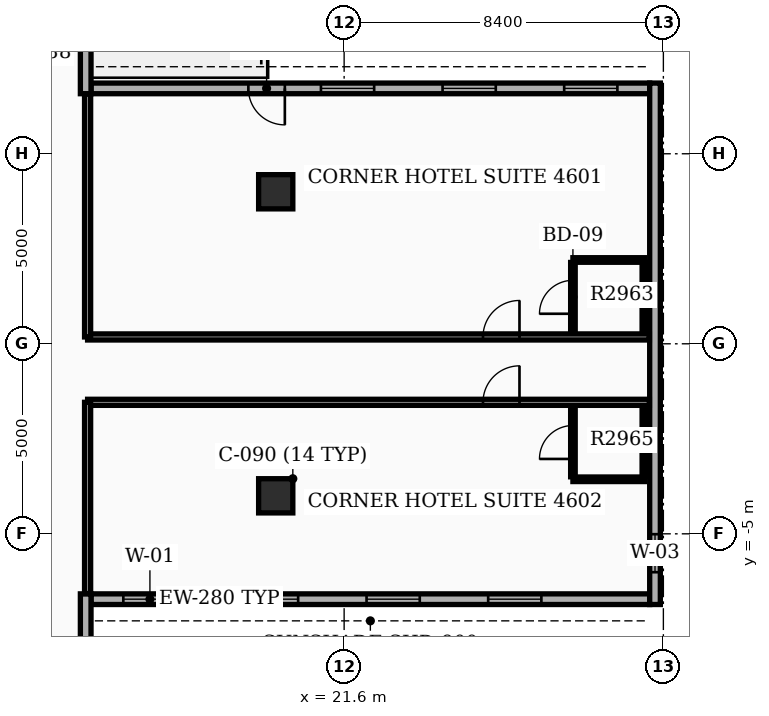
"""IFC4 building model, lengths in metres.
Left out: names, types, materials, properties, quantities, classifications, styles, units other than length and angle.
Written with IfcOpenShell. Run it as: python <this file> out.ifc"""

import sys

from ifc_helpers import new_model, si_unit, direction, frame, frame_2d, origin, origin_2d, place, context, subcontext, project, spatial, rectangle, extrude, element, fill, save


model = new_model("IFC4")
c1 = context("Model", 3, precision=1e-05, world=origin(), true_north=direction((0.0, 1.0)))
c2 = subcontext(c1, "Body", "Model", "MODEL_VIEW")
j1 = project(units=[si_unit("LENGTHUNIT", "METRE"), si_unit("PLANEANGLEUNIT", "RADIAN")], contexts=[c1])
p1 = place(None, origin())
s1 = spatial("IfcSite", under=j1, at=p1, CompositionType="ELEMENT")
p2 = place(p1, origin())
s2 = spatial("IfcBuilding", under=s1, at=p2, CompositionType="ELEMENT")
p3 = place(p2, frame((0.0, 0.0, 183.9)))
s3 = spatial("IfcBuildingStorey", under=s2, at=p3, CompositionType="ELEMENT", Elevation=183.9)
for number, where, z_axis, x_axis in (
    (1, (19.8, -4.0, 0.0), (0.0, 0.0, 1.0), (1.0, 0.0, 0.0)),
    (2, (19.8, 4.0, 0.0), (0.0, 0.0, 1.0), (1.0, 0.0, 0.0)),
):
    element("IfcColumn", number, at=place(p3, frame(where, z_axis=z_axis, x_axis=x_axis)), inside=s3, PredefinedType="COLUMN", context=c2, shape_type="SweptSolid", body=[
        extrude(rectangle(XDim=0.9, YDim=0.9, at=origin_2d()), origin(), (0.0, 0.0, 1.0), 3.9),
    ])
p4 = place(p3, frame((14.94, -6.72, 0.0), z_axis=(0.0, 0.0, 1.0), x_axis=(1.0, 0.0, 0.0)))
e3 = element("IfcWall", 3, at=p4, inside=s3, PredefinedType="STANDARD", context=c2, shape_type="SweptSolid", body=[
    extrude(rectangle(XDim=14.7, YDim=0.28, at=frame_2d((7.35, 0.0))), origin(), (0.0, 0.0, 1.0), 2.97),
])
p5 = place(p4, frame((0.85, 0.0, 0.8)))
e4 = element("IfcOpeningElement", 4, at=p5, cuts=e3, PredefinedType="OPENING", context=c2, shape_type="SweptSolid", body=[
    extrude(rectangle(XDim=1.4, YDim=1.6, at=frame_2d((0.7, 0.8))), frame((0.0, 0.15, 0.0), z_axis=(0.0, -1.0, 0.0), x_axis=(1.0, 0.0, 0.0)), (0.0, 0.0, 1.0), 0.3),
])
p6 = place(p4, frame((4.05, 0.0, 0.8)))
e5 = element("IfcOpeningElement", 5, at=p6, cuts=e3, PredefinedType="OPENING", context=c2, shape_type="SweptSolid", body=[
    extrude(rectangle(XDim=1.4, YDim=1.6, at=frame_2d((0.7, 0.8))), frame((0.0, 0.15, 0.0), z_axis=(0.0, -1.0, 0.0), x_axis=(1.0, 0.0, 0.0)), (0.0, 0.0, 1.0), 0.3),
])
p7 = place(p4, frame((7.25, 0.0, 0.8)))
e6 = element("IfcOpeningElement", 6, at=p7, cuts=e3, PredefinedType="OPENING", context=c2, shape_type="SweptSolid", body=[
    extrude(rectangle(XDim=1.4, YDim=1.6, at=frame_2d((0.7, 0.8))), frame((0.0, 0.15, 0.0), z_axis=(0.0, -1.0, 0.0), x_axis=(1.0, 0.0, 0.0)), (0.0, 0.0, 1.0), 0.3),
])
p8 = place(p4, frame((10.45, 0.0, 0.8)))
e7 = element("IfcOpeningElement", 7, at=p8, cuts=e3, PredefinedType="OPENING", context=c2, shape_type="SweptSolid", body=[
    extrude(rectangle(XDim=1.4, YDim=1.6, at=frame_2d((0.7, 0.8))), frame((0.0, 0.15, 0.0), z_axis=(0.0, -1.0, 0.0), x_axis=(1.0, 0.0, 0.0)), (0.0, 0.0, 1.0), 0.3),
])
p9 = place(p3, frame((29.64, 6.72, 0.0), z_axis=(0.0, 0.0, 1.0), x_axis=(-1.0, 0.0, 0.0)))
e8 = element("IfcWall", 8, at=p9, inside=s3, PredefinedType="STANDARD", context=c2, shape_type="SweptSolid", body=[
    extrude(rectangle(XDim=14.7, YDim=0.28, at=frame_2d((7.35, 0.0))), origin(), (0.0, 0.0, 1.0), 2.97),
])
p10 = place(p9, frame((0.85, 0.0, 0.8)))
e9 = element("IfcOpeningElement", 9, at=p10, cuts=e8, PredefinedType="OPENING", context=c2, shape_type="SweptSolid", body=[
    extrude(rectangle(XDim=1.4, YDim=1.6, at=frame_2d((0.7, 0.8))), frame((0.0, 0.15, 0.0), z_axis=(0.0, -1.0, 0.0), x_axis=(1.0, 0.0, 0.0)), (0.0, 0.0, 1.0), 0.3),
])
p11 = place(p9, frame((4.05, 0.0, 0.8)))
e10 = element("IfcOpeningElement", 10, at=p11, cuts=e8, PredefinedType="OPENING", context=c2, shape_type="SweptSolid", body=[
    extrude(rectangle(XDim=1.4, YDim=1.6, at=frame_2d((0.7, 0.8))), frame((0.0, 0.15, 0.0), z_axis=(0.0, -1.0, 0.0), x_axis=(1.0, 0.0, 0.0)), (0.0, 0.0, 1.0), 0.3),
])
p12 = place(p9, frame((7.25, 0.0, 0.8)))
e11 = element("IfcOpeningElement", 11, at=p12, cuts=e8, PredefinedType="OPENING", context=c2, shape_type="SweptSolid", body=[
    extrude(rectangle(XDim=1.4, YDim=1.6, at=frame_2d((0.7, 0.8))), frame((0.0, 0.15, 0.0), z_axis=(0.0, -1.0, 0.0), x_axis=(1.0, 0.0, 0.0)), (0.0, 0.0, 1.0), 0.3),
])
p13 = place(p9, frame((9.6, 0.0, 0.0)))
e12 = element("IfcOpeningElement", 12, at=p13, cuts=e8, PredefinedType="OPENING", context=c2, shape_type="SweptSolid", body=[
    extrude(rectangle(XDim=0.96, YDim=2.1, at=frame_2d((0.48, 1.05))), frame((0.0, 0.15, 0.0), z_axis=(0.0, -1.0, 0.0), x_axis=(1.0, 0.0, 0.0)), (0.0, 0.0, 1.0), 0.3),
])
p14 = place(p3, frame((29.78, -6.86, 0.0), z_axis=(0.0, 0.0, 1.0), x_axis=(0.0, 1.0, 0.0)))
e13 = element("IfcWall", 13, at=p14, inside=s3, PredefinedType="STANDARD", context=c2, shape_type="SweptSolid", body=[
    extrude(rectangle(XDim=13.72, YDim=0.28, at=frame_2d((6.86, 0.0))), origin(), (0.0, 0.0, 1.0), 2.97),
])
p15 = place(p14, frame((0.85, 0.0, 0.85)))
e14 = element("IfcOpeningElement", 14, at=p15, cuts=e13, PredefinedType="OPENING", context=c2, shape_type="SweptSolid", body=[
    extrude(rectangle(XDim=1.0, YDim=1.5, at=frame_2d((0.5, 0.75))), frame((0.0, 0.15, 0.0), z_axis=(0.0, -1.0, 0.0), x_axis=(1.0, 0.0, 0.0)), (0.0, 0.0, 1.0), 0.3),
])
for number, where, z_axis, x_axis in (
    (15, (14.8, 6.58, 0.0), (0.0, 0.0, 1.0), (0.0, 1.0, 0.0)),
    (16, (14.8, -6.58, 0.0), (0.0, 0.0, 1.0), (0.0, -1.0, 0.0)),
):
    element("IfcWall", number, at=place(p3, frame(where, z_axis=z_axis, x_axis=x_axis)), inside=s3, PredefinedType="STANDARD", context=c2, shape_type="SweptSolid", body=[
        extrude(rectangle(XDim=6.86, YDim=0.28, at=frame_2d((3.43, 0.0))), origin(), (0.0, 0.0, 1.0), 2.97),
    ])
p16 = place(p3, frame((14.85, 0.18, 0.0), z_axis=(0.0, 0.0, 1.0), x_axis=(1.0, 0.0, 0.0)))
e17 = element("IfcWall", 17, at=p16, inside=s3, PredefinedType="PARTITIONING", context=c2, shape_type="SweptSolid", body=[
    extrude(rectangle(XDim=14.782, YDim=0.16, at=frame_2d((7.391, 0.0))), origin(), (0.0, 0.0, 1.0), 2.96),
])
p17 = place(p16, frame((10.404, 0.0, 0.0)))
e18 = element("IfcOpeningElement", 18, at=p17, cuts=e17, PredefinedType="OPENING", context=c2, shape_type="SweptSolid", body=[
    extrude(rectangle(XDim=0.96, YDim=2.15, at=frame_2d((0.48, 1.075))), frame((0.0, 0.09, 0.0), z_axis=(0.0, -1.0, 0.0), x_axis=(1.0, 0.0, 0.0)), (0.0, 0.0, 1.0), 0.18),
])
p18 = place(p3, frame((14.85, 0.18, 0.0), z_axis=(0.0, 0.0, 1.0), x_axis=(0.0, 1.0, 0.0)))
e19 = element("IfcWall", 19, at=p18, inside=s3, PredefinedType="PARTITIONING", context=c2, shape_type="SweptSolid", body=[
    extrude(rectangle(XDim=6.392, YDim=0.16, at=frame_2d((3.196, 0.0))), origin(), (0.0, 0.0, 1.0), 2.96),
])
p19 = place(p3, frame((27.62, 0.32, 0.0), z_axis=(0.0, 0.0, 1.0), x_axis=(0.0, 1.0, 0.0)))
e20 = element("IfcWall", 20, at=p19, inside=s3, PredefinedType="PARTITIONING", context=c2, shape_type="SweptSolid", body=[
    extrude(rectangle(XDim=1.82, YDim=0.12, at=frame_2d((0.91, 0.0))), origin(), (0.0, 0.0, 1.0), 2.96),
])
p20 = place(p19, frame((0.47, 0.0, 0.0)))
e21 = element("IfcOpeningElement", 21, at=p20, cuts=e20, PredefinedType="OPENING", context=c2, shape_type="SweptSolid", body=[
    extrude(rectangle(XDim=0.88, YDim=2.1, at=frame_2d((0.44, 1.05))), frame((0.0, 0.07, 0.0), z_axis=(0.0, -1.0, 0.0), x_axis=(1.0, 0.0, 0.0)), (0.0, 0.0, 1.0), 0.14),
])
p21 = place(p3, frame((29.5, 0.32, 0.0), z_axis=(0.0, 0.0, 1.0), x_axis=(0.0, 1.0, 0.0)))
e22 = element("IfcWall", 22, at=p21, inside=s3, PredefinedType="PARTITIONING", context=c2, shape_type="SweptSolid", body=[
    extrude(rectangle(XDim=1.82, YDim=0.12, at=frame_2d((0.91, 0.0))), origin(), (0.0, 0.0, 1.0), 2.96),
])
p22 = place(p3, frame((27.62, 2.205, 0.0), z_axis=(0.0, 0.0, 1.0), x_axis=(1.0, 0.0, 0.0)))
e23 = element("IfcWall", 23, at=p22, inside=s3, PredefinedType="PARTITIONING", context=c2, shape_type="SweptSolid", body=[
    extrude(rectangle(XDim=1.88, YDim=0.12, at=frame_2d((0.94, 0.0))), origin(), (0.0, 0.0, 1.0), 2.96),
])
p23 = place(p3, frame((14.85, -1.54, 0.0), z_axis=(0.0, 0.0, 1.0), x_axis=(1.0, 0.0, 0.0)))
e24 = element("IfcWall", 24, at=p23, inside=s3, PredefinedType="PARTITIONING", context=c2, shape_type="SweptSolid", body=[
    extrude(rectangle(XDim=14.782, YDim=0.16, at=frame_2d((7.391, 0.0))), origin(), (0.0, 0.0, 1.0), 2.96),
])
p24 = place(p23, frame((10.404, 0.0, 0.0)))
e25 = element("IfcOpeningElement", 25, at=p24, cuts=e24, PredefinedType="OPENING", context=c2, shape_type="SweptSolid", body=[
    extrude(rectangle(XDim=0.96, YDim=2.15, at=frame_2d((0.48, 1.075))), frame((0.0, 0.09, 0.0), z_axis=(0.0, -1.0, 0.0), x_axis=(1.0, 0.0, 0.0)), (0.0, 0.0, 1.0), 0.18),
])
p25 = place(p3, frame((14.85, -1.54, 0.0), z_axis=(0.0, 0.0, 1.0), x_axis=(0.0, -1.0, 0.0)))
e26 = element("IfcWall", 26, at=p25, inside=s3, PredefinedType="PARTITIONING", context=c2, shape_type="SweptSolid", body=[
    extrude(rectangle(XDim=5.032, YDim=0.16, at=frame_2d((2.516, 0.0))), origin(), (0.0, 0.0, 1.0), 2.96),
])
p26 = place(p3, frame((27.62, -3.5, 0.0), z_axis=(0.0, 0.0, 1.0), x_axis=(0.0, 1.0, 0.0)))
e27 = element("IfcWall", 27, at=p26, inside=s3, PredefinedType="PARTITIONING", context=c2, shape_type="SweptSolid", body=[
    extrude(rectangle(XDim=1.82, YDim=0.12, at=frame_2d((0.91, 0.0))), origin(), (0.0, 0.0, 1.0), 2.96),
])
p27 = place(p26, frame((0.47, 0.0, 0.0)))
e28 = element("IfcOpeningElement", 28, at=p27, cuts=e27, PredefinedType="OPENING", context=c2, shape_type="SweptSolid", body=[
    extrude(rectangle(XDim=0.88, YDim=2.1, at=frame_2d((0.44, 1.05))), frame((0.0, 0.07, 0.0), z_axis=(0.0, -1.0, 0.0), x_axis=(1.0, 0.0, 0.0)), (0.0, 0.0, 1.0), 0.14),
])
p28 = place(p3, frame((29.5, -3.5, 0.0), z_axis=(0.0, 0.0, 1.0), x_axis=(0.0, 1.0, 0.0)))
e29 = element("IfcWall", 29, at=p28, inside=s3, PredefinedType="PARTITIONING", context=c2, shape_type="SweptSolid", body=[
    extrude(rectangle(XDim=1.82, YDim=0.12, at=frame_2d((0.91, 0.0))), origin(), (0.0, 0.0, 1.0), 2.96),
])
p29 = place(p3, frame((27.62, -3.565, 0.0), z_axis=(0.0, 0.0, 1.0), x_axis=(1.0, 0.0, 0.0)))
e30 = element("IfcWall", 30, at=p29, inside=s3, PredefinedType="PARTITIONING", context=c2, shape_type="SweptSolid", body=[
    extrude(rectangle(XDim=1.88, YDim=0.12, at=frame_2d((0.94, 0.0))), origin(), (0.0, 0.0, 1.0), 2.96),
])
p30 = place(p5, origin())
e31 = element("IfcWindow", 31, at=p30, inside=s3, PartitioningType="SINGLE_PANEL", PredefinedType="WINDOW", context=c2, shape_type="SweptSolid", body=[
    extrude(rectangle(XDim=1.4, YDim=1.6, at=frame_2d((0.7, 0.8))), frame((0.0, 0.03, 0.0), z_axis=(0.0, -1.0, 0.0), x_axis=(1.0, 0.0, 0.0)), (0.0, 0.0, 1.0), 0.06),
])
fill(e4, e31)
p31 = place(p6, origin())
e32 = element("IfcWindow", 32, at=p31, inside=s3, PartitioningType="SINGLE_PANEL", PredefinedType="WINDOW", context=c2, shape_type="SweptSolid", body=[
    extrude(rectangle(XDim=1.4, YDim=1.6, at=frame_2d((0.7, 0.8))), frame((0.0, 0.03, 0.0), z_axis=(0.0, -1.0, 0.0), x_axis=(1.0, 0.0, 0.0)), (0.0, 0.0, 1.0), 0.06),
])
fill(e5, e32)
p32 = place(p7, origin())
e33 = element("IfcWindow", 33, at=p32, inside=s3, PartitioningType="SINGLE_PANEL", PredefinedType="WINDOW", context=c2, shape_type="SweptSolid", body=[
    extrude(rectangle(XDim=1.4, YDim=1.6, at=frame_2d((0.7, 0.8))), frame((0.0, 0.03, 0.0), z_axis=(0.0, -1.0, 0.0), x_axis=(1.0, 0.0, 0.0)), (0.0, 0.0, 1.0), 0.06),
])
fill(e6, e33)
p33 = place(p8, origin())
e34 = element("IfcWindow", 34, at=p33, inside=s3, PartitioningType="SINGLE_PANEL", PredefinedType="WINDOW", context=c2, shape_type="SweptSolid", body=[
    extrude(rectangle(XDim=1.4, YDim=1.6, at=frame_2d((0.7, 0.8))), frame((0.0, 0.03, 0.0), z_axis=(0.0, -1.0, 0.0), x_axis=(1.0, 0.0, 0.0)), (0.0, 0.0, 1.0), 0.06),
])
fill(e7, e34)
p34 = place(p10, origin())
e35 = element("IfcWindow", 35, at=p34, inside=s3, PartitioningType="SINGLE_PANEL", PredefinedType="WINDOW", context=c2, shape_type="SweptSolid", body=[
    extrude(rectangle(XDim=1.4, YDim=1.6, at=frame_2d((0.7, 0.8))), frame((0.0, 0.03, 0.0), z_axis=(0.0, -1.0, 0.0), x_axis=(1.0, 0.0, 0.0)), (0.0, 0.0, 1.0), 0.06),
])
fill(e9, e35)
p35 = place(p11, origin())
e36 = element("IfcWindow", 36, at=p35, inside=s3, PartitioningType="SINGLE_PANEL", PredefinedType="WINDOW", context=c2, shape_type="SweptSolid", body=[
    extrude(rectangle(XDim=1.4, YDim=1.6, at=frame_2d((0.7, 0.8))), frame((0.0, 0.03, 0.0), z_axis=(0.0, -1.0, 0.0), x_axis=(1.0, 0.0, 0.0)), (0.0, 0.0, 1.0), 0.06),
])
fill(e10, e36)
p36 = place(p12, origin())
e37 = element("IfcWindow", 37, at=p36, inside=s3, PartitioningType="SINGLE_PANEL", PredefinedType="WINDOW", context=c2, shape_type="SweptSolid", body=[
    extrude(rectangle(XDim=1.4, YDim=1.6, at=frame_2d((0.7, 0.8))), frame((0.0, 0.03, 0.0), z_axis=(0.0, -1.0, 0.0), x_axis=(1.0, 0.0, 0.0)), (0.0, 0.0, 1.0), 0.06),
])
fill(e11, e37)
p37 = place(p15, origin())
e38 = element("IfcWindow", 38, at=p37, inside=s3, PartitioningType="SINGLE_PANEL", PredefinedType="WINDOW", context=c2, shape_type="SweptSolid", body=[
    extrude(rectangle(XDim=1.0, YDim=1.5, at=frame_2d((0.5, 0.75))), frame((0.0, 0.03, 0.0), z_axis=(0.0, -1.0, 0.0), x_axis=(1.0, 0.0, 0.0)), (0.0, 0.0, 1.0), 0.06),
])
fill(e14, e38)
p38 = place(p13, origin())
e39 = element("IfcDoor", 39, at=p38, inside=s3, OperationType="SINGLE_SWING_LEFT", PredefinedType="DOOR", context=c2, shape_type="SweptSolid", body=[
    extrude(rectangle(XDim=0.96, YDim=2.1, at=frame_2d((0.48, 1.05))), frame((0.0, 0.025, 0.0), z_axis=(0.0, -1.0, 0.0), x_axis=(1.0, 0.0, 0.0)), (0.0, 0.0, 1.0), 0.05),
])
fill(e12, e39)
p39 = place(p17, origin())
e40 = element("IfcDoor", 40, at=p39, inside=s3, OperationType="SINGLE_SWING_RIGHT", PredefinedType="DOOR", context=c2, shape_type="SweptSolid", body=[
    extrude(rectangle(XDim=0.96, YDim=2.15, at=frame_2d((0.48, 1.075))), frame((0.0, 0.025, 0.0), z_axis=(0.0, -1.0, 0.0), x_axis=(1.0, 0.0, 0.0)), (0.0, 0.0, 1.0), 0.05),
])
fill(e18, e40)
p40 = place(p20, origin())
e41 = element("IfcDoor", 41, at=p40, inside=s3, OperationType="SINGLE_SWING_LEFT", PredefinedType="DOOR", context=c2, shape_type="SweptSolid", body=[
    extrude(rectangle(XDim=0.88, YDim=2.1, at=frame_2d((0.44, 1.05))), frame((0.0, 0.025, 0.0), z_axis=(0.0, -1.0, 0.0), x_axis=(1.0, 0.0, 0.0)), (0.0, 0.0, 1.0), 0.05),
])
fill(e21, e41)
p41 = place(p24, origin())
e42 = element("IfcDoor", 42, at=p41, inside=s3, OperationType="SINGLE_SWING_RIGHT", PredefinedType="DOOR", context=c2, shape_type="SweptSolid", body=[
    extrude(rectangle(XDim=0.96, YDim=2.15, at=frame_2d((0.48, 1.075))), frame((0.0, 0.025, 0.0), z_axis=(0.0, -1.0, 0.0), x_axis=(1.0, 0.0, 0.0)), (0.0, 0.0, 1.0), 0.05),
])
fill(e25, e42)
p42 = place(p27, origin())
e43 = element("IfcDoor", 43, at=p42, inside=s3, OperationType="SINGLE_SWING_LEFT", PredefinedType="DOOR", context=c2, shape_type="SweptSolid", body=[
    extrude(rectangle(XDim=0.88, YDim=2.1, at=frame_2d((0.44, 1.05))), frame((0.0, 0.025, 0.0), z_axis=(0.0, -1.0, 0.0), x_axis=(1.0, 0.0, 0.0)), (0.0, 0.0, 1.0), 0.05),
])
fill(e28, e43)
save(model, sys.argv[1])
